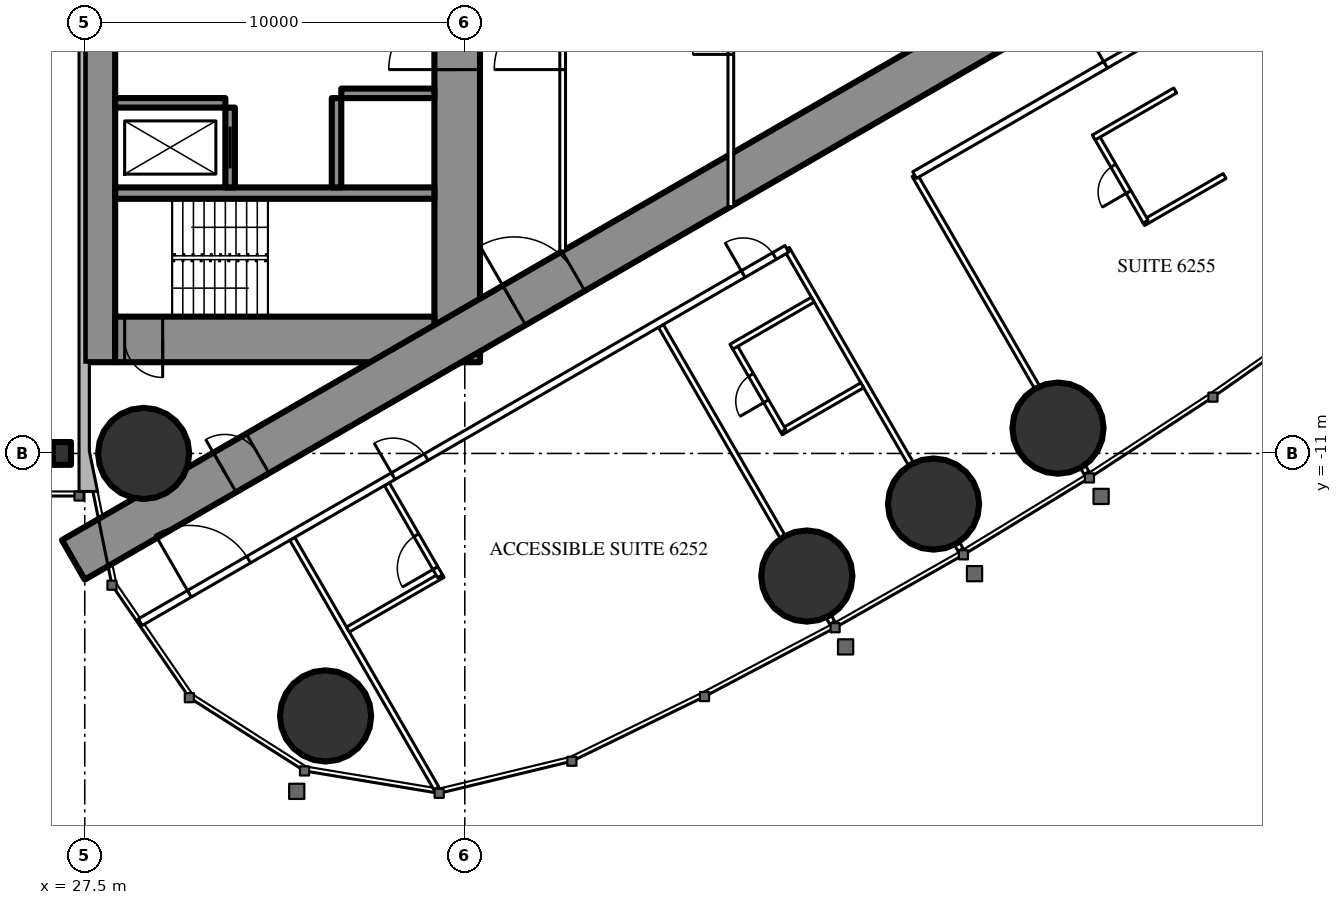
"""IFC4 building model, lengths in metres.
Left out: names, types, materials, properties, quantities, classifications, styles, units other than length and angle.
Written with IfcOpenShell. Run it as: python <this file> out.ifc"""

import sys

from ifc_helpers import new_model, si_unit, direction, frame, frame_2d, origin, origin_2d, place, context, subcontext, project, spatial, rectangle, circle, i_section, extrude, element, fill, save


model = new_model("IFC4")
c1 = context("Model", 3, precision=1e-05, world=origin(), true_north=direction((0.0, 1.0)))
c2 = subcontext(c1, "Body", "Model", "MODEL_VIEW")
j1 = project(units=[si_unit("LENGTHUNIT", "METRE"), si_unit("PLANEANGLEUNIT", "RADIAN")], contexts=[c1])
p1 = place(None, origin())
s1 = spatial("IfcSite", under=j1, at=p1, CompositionType="ELEMENT")
p2 = place(p1, origin())
s2 = spatial("IfcBuilding", under=s1, at=p2, CompositionType="ELEMENT")
p3 = place(p2, frame((0.0, 0.0, 233.3)))
s3 = spatial("IfcBuildingStorey", under=s2, at=p3, CompositionType="ELEMENT", Elevation=233.3)
for number, where, z_axis, x_axis in (
    (1, (33.837, -17.906, 0.0), (0.0, 0.0, 1.0), (1.0, 0.0, 0.0)),
    (2, (29.05, -11.0, 0.0), (0.0, 0.0, 1.0), (1.0, 0.0, 0.0)),
    (3, (46.499, -14.226, 0.0), (0.0, 0.0, 1.0), (1.0, 0.0, 0.0)),
    (4, (49.834, -12.332, 0.0), (0.0, 0.0, 1.0), (1.0, 0.0, 0.0)),
    (5, (53.108, -10.334, 0.0), (0.0, 0.0, 1.0), (1.0, 0.0, 0.0)),
):
    element("IfcColumn", number, at=place(p3, frame(where, z_axis=z_axis, x_axis=x_axis)), inside=s3, PredefinedType="COLUMN", context=c2, shape_type="SweptSolid", body=[
        extrude(circle(Radius=1.2, at=origin_2d()), origin(), (0.0, 0.0, 1.0), 3.6),
    ])
p4 = place(p3, frame((27.9, -8.6, 0.0), z_axis=(0.0, 0.0, 1.0), x_axis=(0.0, 1.0, 0.0)))
e6 = element("IfcWall", 6, at=p4, inside=s3, PredefinedType="SHEAR", context=c2, shape_type="SweptSolid", body=[
    extrude(rectangle(XDim=17.2, YDim=0.8, at=frame_2d((8.6, 0.0))), origin(), (0.0, 0.0, 1.0), 3.6),
])
p5 = place(p4, frame((9.35, 0.0, 0.0)))
e7 = element("IfcOpeningElement", 7, at=p5, cuts=e6, PredefinedType="OPENING", context=c2, shape_type="SweptSolid", body=[
    extrude(rectangle(XDim=0.9, YDim=2.2, at=frame_2d((0.45, 1.1))), frame((0.0, 0.41, 0.0), z_axis=(0.0, -1.0, 0.0), x_axis=(1.0, 0.0, 0.0)), (0.0, 0.0, 1.0), 0.82),
])
p6 = place(p3, frame((37.3, -8.6, 0.0), z_axis=(0.0, 0.0, 1.0), x_axis=(0.0, 1.0, 0.0)))
e8 = element("IfcWall", 8, at=p6, inside=s3, PredefinedType="SHEAR", context=c2, shape_type="SweptSolid", body=[
    extrude(rectangle(XDim=17.2, YDim=1.2, at=frame_2d((8.6, 0.0))), origin(), (0.0, 0.0, 1.0), 3.6),
])
p7 = place(p6, frame((7.7, 0.0, 0.0)))
e9 = element("IfcOpeningElement", 9, at=p7, cuts=e8, PredefinedType="OPENING", context=c2, shape_type="SweptSolid", body=[
    extrude(rectangle(XDim=1.8, YDim=2.2, at=frame_2d((0.9, 1.1))), frame((0.0, 0.61, 0.0), z_axis=(0.0, -1.0, 0.0), x_axis=(1.0, 0.0, 0.0)), (0.0, 0.0, 1.0), 1.22),
])
p8 = place(p3, frame((28.3, -8.0, 0.0), z_axis=(0.0, 0.0, 1.0), x_axis=(1.0, 0.0, 0.0)))
e10 = element("IfcWall", 10, at=p8, inside=s3, PredefinedType="SHEAR", context=c2, shape_type="SweptSolid", body=[
    extrude(rectangle(XDim=8.4, YDim=1.2, at=frame_2d((4.2, 0.0))), origin(), (0.0, 0.0, 1.0), 3.6),
])
p9 = place(p8, frame((0.25, 0.0, 0.0)))
e11 = element("IfcOpeningElement", 11, at=p9, cuts=e10, PredefinedType="OPENING", context=c2, shape_type="SweptSolid", body=[
    extrude(rectangle(XDim=1.0, YDim=2.2, at=frame_2d((0.5, 1.1))), frame((0.0, 0.61, 0.0), z_axis=(0.0, -1.0, 0.0), x_axis=(1.0, 0.0, 0.0)), (0.0, 0.0, 1.0), 1.22),
])
p10 = place(p3, frame((28.3, -4.15, 0.0), z_axis=(0.0, 0.0, 1.0), x_axis=(1.0, 0.0, 0.0)))
e12 = element("IfcWall", 12, at=p10, inside=s3, PredefinedType="SHEAR", context=c2, shape_type="SweptSolid", body=[
    extrude(rectangle(XDim=8.4, YDim=0.3, at=frame_2d((4.2, 0.0))), origin(), (0.0, 0.0, 1.0), 3.6),
])
p11 = place(p3, frame((31.325, -4.0, 0.0), z_axis=(0.0, 0.0, 1.0), x_axis=(0.0, 1.0, 0.0)))
e13 = element("IfcWall", 13, at=p11, inside=s3, PredefinedType="SHEAR", context=c2, shape_type="SweptSolid", body=[
    extrude(rectangle(XDim=2.1, YDim=0.25, at=frame_2d((1.05, 0.0))), origin(), (0.0, 0.0, 1.0), 3.6),
])
p12 = place(p11, frame((0.5, 0.0, 0.0)))
e14 = element("IfcOpeningElement", 14, at=p12, cuts=e13, PredefinedType="OPENING", context=c2, shape_type="SweptSolid", body=[
    extrude(rectangle(XDim=1.1, YDim=2.2, at=frame_2d((0.55, 1.1))), frame((0.0, 0.135, 0.0), z_axis=(0.0, -1.0, 0.0), x_axis=(1.0, 0.0, 0.0)), (0.0, 0.0, 1.0), 0.27),
])
p13 = place(p3, frame((34.125, -4.0, 0.0), z_axis=(0.0, 0.0, 1.0), x_axis=(0.0, 1.0, 0.0)))
e15 = element("IfcWall", 15, at=p13, inside=s3, PredefinedType="SHEAR", context=c2, shape_type="SweptSolid", body=[
    extrude(rectangle(XDim=2.35, YDim=0.25, at=frame_2d((1.175, 0.0))), origin(), (0.0, 0.0, 1.0), 3.6),
])
p14 = place(p3, frame((28.3, -1.775, 0.0), z_axis=(0.0, 0.0, 1.0), x_axis=(1.0, 0.0, 0.0)))
e16 = element("IfcWall", 16, at=p14, inside=s3, PredefinedType="SHEAR", context=c2, shape_type="SweptSolid", body=[
    extrude(rectangle(XDim=2.9, YDim=0.25, at=frame_2d((1.45, 0.0))), origin(), (0.0, 0.0, 1.0), 3.6),
])
p15 = place(p3, frame((34.25, -1.525, 0.0), z_axis=(0.0, 0.0, 1.0), x_axis=(1.0, 0.0, 0.0)))
e17 = element("IfcWall", 17, at=p15, inside=s3, PredefinedType="SHEAR", context=c2, shape_type="SweptSolid", body=[
    extrude(rectangle(XDim=2.45, YDim=0.25, at=frame_2d((1.225, 0.0))), origin(), (0.0, 0.0, 1.0), 3.6),
])
p16 = place(p3, frame((27.2, -13.8, 0.0), z_axis=(0.0, 0.0, 1.0), x_axis=(0.866027159892, 0.499996958321, 0.0)))
e18 = element("IfcWall", 18, at=p16, inside=s3, PredefinedType="SHEAR", context=c2, shape_type="SweptSolid", body=[
    extrude(rectangle(XDim=27.947, YDim=1.2, at=frame_2d((13.973, 0.0))), origin(), (0.0, 0.0, 1.0), 3.6),
])
p17 = place(p16, frame((4.6, 0.0, 0.0)))
e19 = element("IfcOpeningElement", 19, at=p17, cuts=e18, PredefinedType="OPENING", context=c2, shape_type="SweptSolid", body=[
    extrude(rectangle(XDim=1.0, YDim=2.2, at=frame_2d((0.5, 1.1))), frame((0.0, 0.61, 0.0), z_axis=(0.0, -1.0, 0.0), x_axis=(1.0, 0.0, 0.0)), (0.0, 0.0, 1.0), 1.22),
])
p18 = place(p16, frame((13.395, 0.0, 0.0)))
e20 = element("IfcOpeningElement", 20, at=p18, cuts=e18, PredefinedType="OPENING", context=c2, shape_type="SweptSolid", body=[
    extrude(rectangle(XDim=1.8, YDim=2.2, at=frame_2d((0.9, 1.1))), frame((0.0, 0.61, 0.0), z_axis=(0.0, -1.0, 0.0), x_axis=(1.0, 0.0, 0.0)), (0.0, 0.0, 1.0), 1.22),
])
p19 = place(p3, frame((26.9, -11.0, 0.0), z_axis=(0.0, 0.0, 1.0), x_axis=(1.0, 0.0, 0.0)))
e21 = element("IfcColumn", 21, at=p19, inside=s3, PredefinedType="COLUMN", context=c2, shape_type="SweptSolid", body=[
    extrude(i_section(OverallWidth=0.476, OverallDepth=0.6, WebThickness=0.1, FlangeThickness=0.14, FilletRadius=0.02, at=origin_2d()), origin(), (0.0, 0.0, 1.0), 3.6),
])
p20 = place(p3, frame((32.96, -13.246, 0.0), z_axis=(0.0, 0.0, 1.0), x_axis=(0.500000236886, -0.866025267018, 0.0)))
e22 = element("IfcWall", 22, at=p20, inside=s3, PredefinedType="PARTITIONING", context=c2, shape_type="SweptSolid", body=[
    extrude(rectangle(XDim=7.583, YDim=0.15, at=frame_2d((3.791, 0.0))), origin(), (0.0, 0.0, 1.0), 3.35),
])
p21 = place(p3, frame((42.66, -7.646, 0.0), z_axis=(0.0, 0.0, 1.0), x_axis=(0.499996592859, -0.866027370889, 0.0)))
e23 = element("IfcWall", 23, at=p21, inside=s3, PredefinedType="PARTITIONING", context=c2, shape_type="SweptSolid", body=[
    extrude(rectangle(XDim=6.398, YDim=0.15, at=frame_2d((3.199, 0.0))), origin(), (0.0, 0.0, 1.0), 2.45),
])
p22 = place(p3, frame((47.079, -15.3, 0.0), z_axis=(0.0, 0.0, 1.0), x_axis=(0.499212083968, -0.866479829667, 0.0)))
e24 = element("IfcWall", 24, at=p22, inside=s3, PredefinedType="PARTITIONING", context=c2, shape_type="SweptSolid", body=[
    extrude(rectangle(XDim=0.179, YDim=0.15, at=frame_2d((0.09, 0.0))), origin(), (0.0, 0.0, 1.0), 2.45),
])
p23 = place(p3, frame((45.973, -5.617, 0.0), z_axis=(0.0, 0.0, 1.0), x_axis=(0.499985856986, -0.866033569104, 0.0)))
e25 = element("IfcWall", 25, at=p23, inside=s3, PredefinedType="PARTITIONING", context=c2, shape_type="SweptSolid", body=[
    extrude(rectangle(XDim=6.526, YDim=0.15, at=frame_2d((3.263, 0.0))), origin(), (0.0, 0.0, 1.0), 2.45),
])
p24 = place(p3, frame((50.456, -13.382, 0.0), z_axis=(0.0, 0.0, 1.0), x_axis=(0.500661834965, -0.865642955848, 0.0)))
e26 = element("IfcWall", 26, at=p24, inside=s3, PredefinedType="PARTITIONING", context=c2, shape_type="SweptSolid", body=[
    extrude(rectangle(XDim=0.18, YDim=0.15, at=frame_2d((0.09, 0.0))), origin(), (0.0, 0.0, 1.0), 2.45),
])
p25 = place(p3, frame((49.335, -3.676, 0.0), z_axis=(0.0, 0.0, 1.0), x_axis=(0.500000613642, -0.866025049498, 0.0)))
e27 = element("IfcWall", 27, at=p25, inside=s3, PredefinedType="PARTITIONING", context=c2, shape_type="SweptSolid", body=[
    extrude(rectangle(XDim=6.433, YDim=0.15, at=frame_2d((3.216, 0.0))), origin(), (0.0, 0.0, 1.0), 2.45),
])
p26 = place(p3, frame((53.771, -11.36, 0.0), z_axis=(0.0, 0.0, 1.0), x_axis=(0.499524978789, -0.866299483762, 0.0)))
e28 = element("IfcWall", 28, at=p26, inside=s3, PredefinedType="PARTITIONING", context=c2, shape_type="SweptSolid", body=[
    extrude(rectangle(XDim=0.178, YDim=0.15, at=frame_2d((0.089, 0.0))), origin(), (0.0, 0.0, 1.0), 2.45),
])
p27 = place(p3, frame((34.425, -15.633, 0.0), z_axis=(0.0, 0.0, 1.0), x_axis=(0.866018712932, 0.500011588718, 0.0)))
e29 = element("IfcWall", 29, at=p27, inside=s3, PredefinedType="PARTITIONING", context=c2, shape_type="SweptSolid", body=[
    extrude(rectangle(XDim=2.875, YDim=0.15, at=frame_2d((1.438, 0.0))), origin(), (0.0, 0.0, 1.0), 3.35),
])
p28 = place(p3, frame((35.45, -11.808, 0.0), z_axis=(0.0, 0.0, 1.0), x_axis=(0.49994636267, -0.866056369097, 0.0)))
e30 = element("IfcWall", 30, at=p28, inside=s3, PredefinedType="PARTITIONING", context=c2, shape_type="SweptSolid", body=[
    extrude(rectangle(XDim=2.8, YDim=0.15, at=frame_2d((1.4, 0.0))), origin(), (0.0, 0.0, 1.0), 3.35),
])
p29 = place(p28, frame((1.55, 0.0, 0.0)))
e31 = element("IfcOpeningElement", 31, at=p29, cuts=e30, PredefinedType="OPENING", context=c2, shape_type="SweptSolid", body=[
    extrude(rectangle(XDim=1.0, YDim=2.2, at=frame_2d((0.5, 1.1))), frame((0.0, 0.085, 0.0), z_axis=(0.0, -1.0, 0.0), x_axis=(1.0, 0.0, 0.0)), (0.0, 0.0, 1.0), 0.17),
])
p30 = place(p3, frame((45.814, -10.443, 0.0), z_axis=(0.0, 0.0, 1.0), x_axis=(0.866073894602, 0.499916002032, 0.0)))
e32 = element("IfcWall", 32, at=p30, inside=s3, PredefinedType="PARTITIONING", context=c2, shape_type="SweptSolid", body=[
    extrude(rectangle(XDim=2.475, YDim=0.15, at=frame_2d((1.238, 0.0))), origin(), (0.0, 0.0, 1.0), 3.35),
])
p31 = place(p3, frame((44.579, -8.154, 0.0), z_axis=(0.0, 0.0, 1.0), x_axis=(0.500006934395, -0.866021400173, 0.0)))
e33 = element("IfcWall", 33, at=p31, inside=s3, PredefinedType="PARTITIONING", context=c2, shape_type="SweptSolid", body=[
    extrude(rectangle(XDim=2.6, YDim=0.15, at=frame_2d((1.3, 0.0))), origin(), (0.0, 0.0, 1.0), 3.35),
])
p32 = place(p31, frame((0.9, 0.0, 0.0)))
e34 = element("IfcOpeningElement", 34, at=p32, cuts=e33, PredefinedType="OPENING", context=c2, shape_type="SweptSolid", body=[
    extrude(rectangle(XDim=0.8, YDim=2.2, at=frame_2d((0.4, 1.1))), frame((0.0, 0.085, 0.0), z_axis=(0.0, -1.0, 0.0), x_axis=(1.0, 0.0, 0.0)), (0.0, 0.0, 1.0), 0.17),
])
p33 = place(p3, frame((44.514, -8.191, 0.0), z_axis=(0.0, 0.0, 1.0), x_axis=(0.866031185235, 0.4999899861, 0.0)))
e35 = element("IfcWall", 35, at=p33, inside=s3, PredefinedType="PARTITIONING", context=c2, shape_type="SweptSolid", body=[
    extrude(rectangle(XDim=2.475, YDim=0.15, at=frame_2d((1.238, 0.0))), origin(), (0.0, 0.0, 1.0), 3.35),
])
p34 = place(p3, frame((55.349, -4.938, 0.0), z_axis=(0.0, 0.0, 1.0), x_axis=(0.866006523861, 0.500032699561, 0.0)))
e36 = element("IfcWall", 36, at=p34, inside=s3, PredefinedType="PARTITIONING", context=c2, shape_type="SweptSolid", body=[
    extrude(rectangle(XDim=2.475, YDim=0.15, at=frame_2d((1.237, 0.0))), origin(), (0.0, 0.0, 1.0), 3.35),
])
p35 = place(p3, frame((54.114, -2.649, 0.0), z_axis=(0.0, 0.0, 1.0), x_axis=(0.500006934395, -0.866021400173, 0.0)))
e37 = element("IfcWall", 37, at=p35, inside=s3, PredefinedType="PARTITIONING", context=c2, shape_type="SweptSolid", body=[
    extrude(rectangle(XDim=2.6, YDim=0.15, at=frame_2d((1.3, 0.0))), origin(), (0.0, 0.0, 1.0), 3.35),
])
p36 = place(p35, frame((0.9, 0.0, 0.0)))
e38 = element("IfcOpeningElement", 38, at=p36, cuts=e37, PredefinedType="OPENING", context=c2, shape_type="SweptSolid", body=[
    extrude(rectangle(XDim=0.8, YDim=2.2, at=frame_2d((0.4, 1.1))), frame((0.0, 0.085, 0.0), z_axis=(0.0, -1.0, 0.0), x_axis=(1.0, 0.0, 0.0)), (0.0, 0.0, 1.0), 0.17),
])
p37 = place(p3, frame((54.049, -2.687, 0.0), z_axis=(0.0, 0.0, 1.0), x_axis=(0.866006523861, 0.500032699561, 0.0)))
e39 = element("IfcWall", 39, at=p37, inside=s3, PredefinedType="PARTITIONING", context=c2, shape_type="SweptSolid", body=[
    extrude(rectangle(XDim=2.475, YDim=0.15, at=frame_2d((1.237, 0.0))), origin(), (0.0, 0.0, 1.0), 3.35),
])
p38 = place(p3, frame((28.959, -15.44, 0.0), z_axis=(0.0, 0.0, 1.0), x_axis=(0.866025204199, 0.500000345692, 0.0)))
e40 = element("IfcWall", 40, at=p38, inside=s3, PredefinedType="PARTITIONING", context=c2, shape_type="SweptSolid", body=[
    extrude(rectangle(XDim=19.646, YDim=0.2, at=frame_2d((9.823, 0.0))), origin(), (0.0, 0.0, 1.0), 3.35),
])
p39 = place(p38, frame((1.494, 0.0, 0.0)))
e41 = element("IfcOpeningElement", 41, at=p39, cuts=e40, PredefinedType="OPENING", context=c2, shape_type="SweptSolid", body=[
    extrude(rectangle(XDim=1.8, YDim=2.03, at=frame_2d((0.9, 1.015))), frame((0.0, 0.11, 0.0), z_axis=(0.0, -1.0, 0.0), x_axis=(1.0, 0.0, 0.0)), (0.0, 0.0, 1.0), 0.22),
])
p40 = place(p38, frame((7.687, 0.0, 0.0)))
e42 = element("IfcOpeningElement", 42, at=p40, cuts=e40, PredefinedType="OPENING", context=c2, shape_type="SweptSolid", body=[
    extrude(rectangle(XDim=1.0, YDim=2.2, at=frame_2d((0.5, 1.1))), frame((0.0, 0.11, 0.0), z_axis=(0.0, -1.0, 0.0), x_axis=(1.0, 0.0, 0.0)), (0.0, 0.0, 1.0), 0.22),
])
p41 = place(p38, frame((18.321, 0.0, 0.0)))
e43 = element("IfcOpeningElement", 43, at=p41, cuts=e40, PredefinedType="OPENING", context=c2, shape_type="SweptSolid", body=[
    extrude(rectangle(XDim=0.95, YDim=2.2, at=frame_2d((0.475, 1.1))), frame((0.0, 0.11, 0.0), z_axis=(0.0, -1.0, 0.0), x_axis=(1.0, 0.0, 0.0)), (0.0, 0.0, 1.0), 0.22),
])
p42 = place(p3, frame((49.335, -3.676, 0.0), z_axis=(0.0, 0.0, 1.0), x_axis=(0.866021344046, 0.500007031608, 0.0)))
e44 = element("IfcWall", 44, at=p42, inside=s3, PredefinedType="PARTITIONING", context=c2, shape_type="SweptSolid", body=[
    extrude(rectangle(XDim=7.352, YDim=0.2, at=frame_2d((3.676, 0.0))), origin(), (0.0, 0.0, 1.0), 3.35),
])
p43 = place(p42, frame((5.802, 0.0, 0.0)))
e45 = element("IfcOpeningElement", 45, at=p43, cuts=e44, PredefinedType="OPENING", context=c2, shape_type="SweptSolid", body=[
    extrude(rectangle(XDim=0.95, YDim=2.2, at=frame_2d((0.475, 1.1))), frame((0.0, 0.11, 0.0), z_axis=(0.0, -1.0, 0.0), x_axis=(1.0, 0.0, 0.0)), (0.0, 0.0, 1.0), 0.22),
])
p44 = place(p3, frame((40.075, -5.674, 0.0), z_axis=(0.0, 0.0, 1.0), x_axis=(0.0, 1.0, 0.0)))
e46 = element("IfcWall", 46, at=p44, inside=s3, PredefinedType="PARTITIONING", context=c2, shape_type="SweptSolid", body=[
    extrude(rectangle(XDim=11.348, YDim=0.15, at=frame_2d((5.674, 0.0))), origin(), (0.0, 0.0, 1.0), 3.35),
])
p45 = place(p44, frame((4.774, 0.0, 0.0)))
e47 = element("IfcOpeningElement", 47, at=p45, cuts=e46, PredefinedType="OPENING", context=c2, shape_type="SweptSolid", body=[
    extrude(rectangle(XDim=1.8, YDim=2.2, at=frame_2d((0.9, 1.1))), frame((0.0, 0.085, 0.0), z_axis=(0.0, -1.0, 0.0), x_axis=(1.0, 0.0, 0.0)), (0.0, 0.0, 1.0), 0.17),
])
p46 = place(p3, frame((44.5, -4.505, 0.0), z_axis=(0.0, 0.0, 1.0), x_axis=(0.0, 1.0, 0.0)))
e48 = element("IfcWall", 48, at=p46, inside=s3, PredefinedType="PARTITIONING", context=c2, shape_type="SweptSolid", body=[
    extrude(rectangle(XDim=9.009, YDim=0.15, at=frame_2d((4.505, 0.0))), origin(), (0.0, 0.0, 1.0), 3.35),
])
p47 = place(p46, frame((4.005, 0.0, 0.0)))
e49 = element("IfcOpeningElement", 49, at=p47, cuts=e48, PredefinedType="OPENING", context=c2, shape_type="SweptSolid", body=[
    extrude(rectangle(XDim=1.0, YDim=2.2, at=frame_2d((0.5, 1.1))), frame((0.0, 0.085, 0.0), z_axis=(0.0, -1.0, 0.0), x_axis=(1.0, 0.0, 0.0)), (0.0, 0.0, 1.0), 0.17),
])
p48 = place(p39, origin())
e50 = element("IfcDoor", 50, at=p48, inside=s3, OperationType="DOUBLE_DOOR_SINGLE_SWING", PredefinedType="DOOR", context=c2, shape_type="SweptSolid", body=[
    extrude(rectangle(XDim=1.8, YDim=2.03, at=frame_2d((0.9, 1.015))), frame((0.0, 0.025, 0.0), z_axis=(0.0, -1.0, 0.0), x_axis=(1.0, 0.0, 0.0)), (0.0, 0.0, 1.0), 0.05),
])
fill(e41, e50)
p49 = place(p29, origin())
e51 = element("IfcDoor", 51, at=p49, inside=s3, OperationType="SINGLE_SWING_RIGHT", PredefinedType="DOOR", context=c2, shape_type="SweptSolid", body=[
    extrude(rectangle(XDim=1.0, YDim=2.2, at=frame_2d((0.5, 1.1))), frame((0.0, 0.025, 0.0), z_axis=(0.0, -1.0, 0.0), x_axis=(1.0, 0.0, 0.0)), (0.0, 0.0, 1.0), 0.05),
])
fill(e31, e51)
p50 = place(p40, origin())
e52 = element("IfcDoor", 52, at=p50, inside=s3, OperationType="SINGLE_SWING_LEFT", PredefinedType="DOOR", context=c2, shape_type="SweptSolid", body=[
    extrude(rectangle(XDim=1.0, YDim=2.2, at=frame_2d((0.5, 1.1))), frame((0.0, 0.025, 0.0), z_axis=(0.0, -1.0, 0.0), x_axis=(1.0, 0.0, 0.0)), (0.0, 0.0, 1.0), 0.05),
])
fill(e42, e52)
p51 = place(p32, origin())
e53 = element("IfcDoor", 53, at=p51, inside=s3, OperationType="SINGLE_SWING_RIGHT", PredefinedType="DOOR", context=c2, shape_type="SweptSolid", body=[
    extrude(rectangle(XDim=0.8, YDim=2.2, at=frame_2d((0.4, 1.1))), frame((0.0, 0.025, 0.0), z_axis=(0.0, -1.0, 0.0), x_axis=(1.0, 0.0, 0.0)), (0.0, 0.0, 1.0), 0.05),
])
fill(e34, e53)
p52 = place(p41, origin())
e54 = element("IfcDoor", 54, at=p52, inside=s3, OperationType="SINGLE_SWING_LEFT", PredefinedType="DOOR", context=c2, shape_type="SweptSolid", body=[
    extrude(rectangle(XDim=0.95, YDim=2.2, at=frame_2d((0.475, 1.1))), frame((0.0, 0.025, 0.0), z_axis=(0.0, -1.0, 0.0), x_axis=(1.0, 0.0, 0.0)), (0.0, 0.0, 1.0), 0.05),
])
fill(e43, e54)
p53 = place(p36, origin())
e55 = element("IfcDoor", 55, at=p53, inside=s3, OperationType="SINGLE_SWING_RIGHT", PredefinedType="DOOR", context=c2, shape_type="SweptSolid", body=[
    extrude(rectangle(XDim=0.8, YDim=2.2, at=frame_2d((0.4, 1.1))), frame((0.0, 0.025, 0.0), z_axis=(0.0, -1.0, 0.0), x_axis=(1.0, 0.0, 0.0)), (0.0, 0.0, 1.0), 0.05),
])
fill(e38, e55)
p54 = place(p43, origin())
e56 = element("IfcDoor", 56, at=p54, inside=s3, OperationType="SINGLE_SWING_LEFT", PredefinedType="DOOR", context=c2, shape_type="SweptSolid", body=[
    extrude(rectangle(XDim=0.95, YDim=2.2, at=frame_2d((0.475, 1.1))), frame((0.0, 0.025, 0.0), z_axis=(0.0, -1.0, 0.0), x_axis=(1.0, 0.0, 0.0)), (0.0, 0.0, 1.0), 0.05),
])
fill(e45, e56)
p55 = place(p45, origin())
e57 = element("IfcDoor", 57, at=p55, inside=s3, OperationType="DOUBLE_DOOR_SINGLE_SWING", PredefinedType="DOOR", context=c2, shape_type="SweptSolid", body=[
    extrude(rectangle(XDim=1.8, YDim=2.2, at=frame_2d((0.9, 1.1))), frame((0.0, 0.025, 0.0), z_axis=(0.0, -1.0, 0.0), x_axis=(1.0, 0.0, 0.0)), (0.0, 0.0, 1.0), 0.05),
])
fill(e47, e57)
p56 = place(p47, origin())
e58 = element("IfcDoor", 58, at=p56, inside=s3, OperationType="SINGLE_SWING_LEFT", PredefinedType="DOOR", context=c2, shape_type="SweptSolid", body=[
    extrude(rectangle(XDim=1.0, YDim=2.2, at=frame_2d((0.5, 1.1))), frame((0.0, 0.025, 0.0), z_axis=(0.0, -1.0, 0.0), x_axis=(1.0, 0.0, 0.0)), (0.0, 0.0, 1.0), 0.05),
])
fill(e49, e58)
p57 = place(p17, origin())
e59 = element("IfcDoor", 59, at=p57, inside=s3, OperationType="SINGLE_SWING_LEFT", PredefinedType="DOOR", context=c2, shape_type="SweptSolid", body=[
    extrude(rectangle(XDim=1.0, YDim=2.2, at=frame_2d((0.5, 1.1))), frame((0.0, 0.025, 0.0), z_axis=(0.0, -1.0, 0.0), x_axis=(1.0, 0.0, 0.0)), (0.0, 0.0, 1.0), 0.05),
])
fill(e19, e59)
p58 = place(p18, origin())
e60 = element("IfcDoor", 60, at=p58, inside=s3, OperationType="DOUBLE_DOOR_SINGLE_SWING", PredefinedType="DOOR", context=c2, shape_type="SweptSolid", body=[
    extrude(rectangle(XDim=1.8, YDim=2.2, at=frame_2d((0.9, 1.1))), frame((0.0, 0.025, 0.0), z_axis=(0.0, -1.0, 0.0), x_axis=(1.0, 0.0, 0.0)), (0.0, 0.0, 1.0), 0.05),
])
fill(e20, e60)
p59 = place(p7, origin())
e61 = element("IfcDoor", 61, at=p59, inside=s3, OperationType="DOUBLE_DOOR_SINGLE_SWING", PredefinedType="DOOR", context=c2, shape_type="SweptSolid", body=[
    extrude(rectangle(XDim=1.8, YDim=2.2, at=frame_2d((0.9, 1.1))), frame((0.0, 0.025, 0.0), z_axis=(0.0, -1.0, 0.0), x_axis=(1.0, 0.0, 0.0)), (0.0, 0.0, 1.0), 0.05),
])
fill(e9, e61)
p60 = place(p9, origin())
e62 = element("IfcDoor", 62, at=p60, inside=s3, OperationType="SINGLE_SWING_RIGHT", PredefinedType="DOOR", context=c2, shape_type="SweptSolid", body=[
    extrude(rectangle(XDim=1.0, YDim=2.2, at=frame_2d((0.5, 1.1))), frame((0.0, 0.025, 0.0), z_axis=(0.0, -1.0, 0.0), x_axis=(1.0, 0.0, 0.0)), (0.0, 0.0, 1.0), 0.05),
])
fill(e11, e62)
p61 = place(p12, origin())
e63 = element("IfcDoor", 63, at=p61, inside=s3, OperationType="SLIDING_TO_LEFT", PredefinedType="USERDEFINED", context=c2, shape_type="SweptSolid", body=[
    extrude(rectangle(XDim=1.1, YDim=2.2, at=frame_2d((0.55, 1.1))), frame((0.0, 0.025, 0.0), z_axis=(0.0, -1.0, 0.0), x_axis=(1.0, 0.0, 0.0)), (0.0, 0.0, 1.0), 0.05),
])
fill(e14, e63)
save(model, sys.argv[1])
